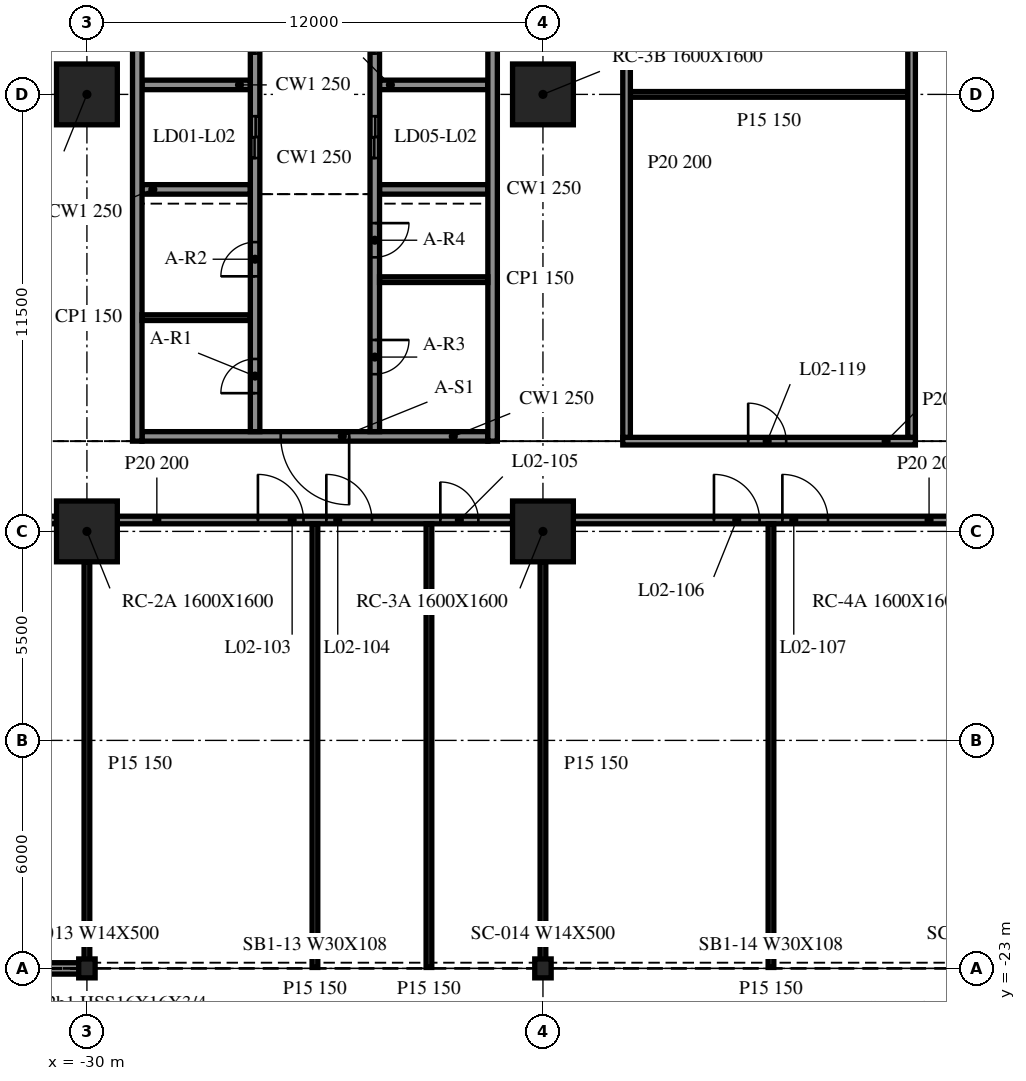
"""IFC4 building model, lengths in metres.
Left out: names, types, materials, properties, quantities, classifications, styles, units other than length and angle.
Written with IfcOpenShell. Run it as: python <this file> out.ifc"""

import sys

from ifc_helpers import new_model, si_unit, direction, frame, frame_2d, origin, origin_2d, place, context, subcontext, project, spatial, rectangle, i_section, extrude, element, fill, save


model = new_model("IFC4")
c1 = context("Model", 3, precision=1e-05, world=origin(), true_north=direction((0.0, 1.0)))
c2 = subcontext(c1, "Body", "Model", "MODEL_VIEW")
j1 = project(units=[si_unit("LENGTHUNIT", "METRE"), si_unit("PLANEANGLEUNIT", "RADIAN")], contexts=[c1])
p1 = place(None, origin())
s1 = spatial("IfcSite", under=j1, at=p1, CompositionType="ELEMENT")
p2 = place(p1, origin())
s2 = spatial("IfcBuilding", under=s1, at=p2, CompositionType="ELEMENT")
p3 = place(p2, frame((0.0, 0.0, 11.5)))
s3 = spatial("IfcBuildingStorey", under=s2, at=p3, CompositionType="ELEMENT", Elevation=11.5)
for number, where, z_axis, x_axis in (
    (1, (-30.0, -11.5, -0.34), (0.0, 0.0, 1.0), (1.0, 0.0, 0.0)),
    (2, (-30.0, 0.0, -0.34), (0.0, 0.0, 1.0), (1.0, 0.0, 0.0)),
    (3, (-18.0, -11.5, -0.34), (0.0, 0.0, 1.0), (1.0, 0.0, 0.0)),
    (4, (-18.0, 0.0, -0.34), (0.0, 0.0, 1.0), (1.0, 0.0, 0.0)),
):
    element("IfcColumn", number, at=place(p3, frame(where, z_axis=z_axis, x_axis=x_axis)), inside=s3, PredefinedType="COLUMN", context=c2, shape_type="SweptSolid", body=[
        extrude(rectangle(XDim=1.6, YDim=1.6, at=origin_2d()), origin(), (0.0, 0.0, 1.0), 4.3),
    ])
for number, where, z_axis, x_axis in (
    (5, (-30.0, -23.0, -0.34), (0.0, 0.0, 1.0), (1.0, 0.0, 0.0)),
    (6, (-18.0, -23.0, -0.34), (0.0, 0.0, 1.0), (1.0, 0.0, 0.0)),
):
    element("IfcColumn", number, at=place(p3, frame(where, z_axis=z_axis, x_axis=x_axis)), inside=s3, PredefinedType="COLUMN", context=c2, shape_type="SweptSolid", body=[
        extrude(i_section(OverallWidth=0.432, OverallDepth=0.498, WebThickness=0.056, FlangeThickness=0.089, at=origin_2d()), origin(), (0.0, 0.0, 1.0), 4.3),
    ])
p4 = place(p3, frame((-41.972, -23.0, 0.0), z_axis=(0.0, 0.0, 1.0), x_axis=(1.0, 0.0, 0.0)))
e7 = element("IfcWall", 7, at=p4, inside=s3, PredefinedType="NOTDEFINED", context=c2, shape_type="SweptSolid", body=[
    extrude(rectangle(XDim=11.944, YDim=0.3, at=frame_2d((5.972, 0.0))), origin(), (0.0, 0.0, 1.0), 3.203),
])
for number, where, z_axis, x_axis in (
    (8, (-28.675, 15.125, 0.0), (0.0, 0.0, 1.0), (0.0, -1.0, 0.0)),
    (9, (-19.325, -9.125, 0.0), (0.0, 0.0, 1.0), (0.0, 1.0, 0.0)),
):
    element("IfcWall", number, at=place(p3, frame(where, z_axis=z_axis, x_axis=x_axis)), inside=s3, PredefinedType="SOLIDWALL", context=c2, shape_type="SweptSolid", body=[
        extrude(rectangle(XDim=24.25, YDim=0.25, at=frame_2d((12.125, 0.0))), origin(), (0.0, 0.0, 1.0), 3.96),
    ])
p5 = place(p3, frame((-19.45, -9.0, 0.0), z_axis=(0.0, 0.0, 1.0), x_axis=(-1.0, 0.0, 0.0)))
e10 = element("IfcWall", 10, at=p5, inside=s3, PredefinedType="SOLIDWALL", context=c2, shape_type="SweptSolid", body=[
    extrude(rectangle(XDim=9.1, YDim=0.25, at=frame_2d((4.55, 0.0))), origin(), (0.0, 0.0, 1.0), 3.96),
])
p6 = place(p5, frame((3.65, 0.0, 0.0)))
e11 = element("IfcOpeningElement", 11, at=p6, cuts=e10, PredefinedType="OPENING", context=c2, shape_type="SweptSolid", body=[
    extrude(rectangle(XDim=1.8, YDim=2.1, at=frame_2d((0.9, 1.05))), frame((0.0, 0.135, 0.0), z_axis=(0.0, -1.0, 0.0), x_axis=(1.0, 0.0, 0.0)), (0.0, 0.0, 1.0), 0.27),
])
p7 = place(p3, frame((-25.575, -8.875, 0.0), z_axis=(0.0, 0.0, 1.0), x_axis=(0.0, 1.0, 0.0)))
e12 = element("IfcWall", 12, at=p7, inside=s3, PredefinedType="SOLIDWALL", context=c2, shape_type="SweptSolid", body=[
    extrude(rectangle(XDim=17.5, YDim=0.25, at=frame_2d((8.75, 0.0))), origin(), (0.0, 0.0, 1.0), 3.96),
])
p8 = place(p7, frame((7.2, 0.0, 0.0)))
e13 = element("IfcOpeningElement", 13, at=p8, cuts=e12, PredefinedType="OPENING", context=c2, shape_type="SweptSolid", body=[
    extrude(rectangle(XDim=1.1, YDim=2.1, at=frame_2d((0.55, 1.05))), frame((0.0, 0.135, 0.0), z_axis=(0.0, -1.0, 0.0), x_axis=(1.0, 0.0, 0.0)), (0.0, 0.0, 1.0), 0.27),
])
p9 = place(p7, frame((9.95, 0.0, 0.0)))
e14 = element("IfcOpeningElement", 14, at=p9, cuts=e12, PredefinedType="OPENING", context=c2, shape_type="SweptSolid", body=[
    extrude(rectangle(XDim=1.1, YDim=2.1, at=frame_2d((0.55, 1.05))), frame((0.0, 0.135, 0.0), z_axis=(0.0, -1.0, 0.0), x_axis=(1.0, 0.0, 0.0)), (0.0, 0.0, 1.0), 0.27),
])
p10 = place(p7, frame((12.7, 0.0, 0.0)))
e15 = element("IfcOpeningElement", 15, at=p10, cuts=e12, PredefinedType="OPENING", context=c2, shape_type="SweptSolid", body=[
    extrude(rectangle(XDim=1.1, YDim=2.1, at=frame_2d((0.55, 1.05))), frame((0.0, 0.135, 0.0), z_axis=(0.0, -1.0, 0.0), x_axis=(1.0, 0.0, 0.0)), (0.0, 0.0, 1.0), 0.27),
])
p11 = place(p7, frame((15.45, 0.0, 0.0)))
e16 = element("IfcOpeningElement", 16, at=p11, cuts=e12, PredefinedType="OPENING", context=c2, shape_type="SweptSolid", body=[
    extrude(rectangle(XDim=1.1, YDim=2.1, at=frame_2d((0.55, 1.05))), frame((0.0, 0.135, 0.0), z_axis=(0.0, -1.0, 0.0), x_axis=(1.0, 0.0, 0.0)), (0.0, 0.0, 1.0), 0.27),
])
p12 = place(p7, frame((1.012, 0.0, 0.0)))
e17 = element("IfcOpeningElement", 17, at=p12, cuts=e12, PredefinedType="OPENING", context=c2, shape_type="SweptSolid", body=[
    extrude(rectangle(XDim=0.9, YDim=2.1, at=frame_2d((0.45, 1.05))), frame((0.0, 0.135, 0.0), z_axis=(0.0, -1.0, 0.0), x_axis=(1.0, 0.0, 0.0)), (0.0, 0.0, 1.0), 0.27),
])
p13 = place(p7, frame((4.087, 0.0, 0.0)))
e18 = element("IfcOpeningElement", 18, at=p13, cuts=e12, PredefinedType="OPENING", context=c2, shape_type="SweptSolid", body=[
    extrude(rectangle(XDim=0.9, YDim=2.1, at=frame_2d((0.45, 1.05))), frame((0.0, 0.135, 0.0), z_axis=(0.0, -1.0, 0.0), x_axis=(1.0, 0.0, 0.0)), (0.0, 0.0, 1.0), 0.27),
])
p14 = place(p3, frame((-22.425, 14.875, 0.0), z_axis=(0.0, 0.0, 1.0), x_axis=(0.0, -1.0, 0.0)))
e19 = element("IfcWall", 19, at=p14, inside=s3, PredefinedType="SOLIDWALL", context=c2, shape_type="SweptSolid", body=[
    extrude(rectangle(XDim=23.75, YDim=0.25, at=frame_2d((11.875, 0.0))), origin(), (0.0, 0.0, 1.0), 3.96),
])
p15 = place(p14, frame((15.45, 0.0, 0.0)))
e20 = element("IfcOpeningElement", 20, at=p15, cuts=e19, PredefinedType="OPENING", context=c2, shape_type="SweptSolid", body=[
    extrude(rectangle(XDim=1.1, YDim=2.1, at=frame_2d((0.55, 1.05))), frame((0.0, 0.135, 0.0), z_axis=(0.0, -1.0, 0.0), x_axis=(1.0, 0.0, 0.0)), (0.0, 0.0, 1.0), 0.27),
])
p16 = place(p14, frame((12.7, 0.0, 0.0)))
e21 = element("IfcOpeningElement", 21, at=p16, cuts=e19, PredefinedType="OPENING", context=c2, shape_type="SweptSolid", body=[
    extrude(rectangle(XDim=1.1, YDim=2.1, at=frame_2d((0.55, 1.05))), frame((0.0, 0.135, 0.0), z_axis=(0.0, -1.0, 0.0), x_axis=(1.0, 0.0, 0.0)), (0.0, 0.0, 1.0), 0.27),
])
p17 = place(p14, frame((21.337, 0.0, 0.0)))
e22 = element("IfcOpeningElement", 22, at=p17, cuts=e19, PredefinedType="OPENING", context=c2, shape_type="SweptSolid", body=[
    extrude(rectangle(XDim=0.9, YDim=2.1, at=frame_2d((0.45, 1.05))), frame((0.0, 0.135, 0.0), z_axis=(0.0, -1.0, 0.0), x_axis=(1.0, 0.0, 0.0)), (0.0, 0.0, 1.0), 0.27),
])
p18 = place(p14, frame((18.262, 0.0, 0.0)))
e23 = element("IfcOpeningElement", 23, at=p18, cuts=e19, PredefinedType="OPENING", context=c2, shape_type="SweptSolid", body=[
    extrude(rectangle(XDim=0.9, YDim=2.1, at=frame_2d((0.45, 1.05))), frame((0.0, 0.135, 0.0), z_axis=(0.0, -1.0, 0.0), x_axis=(1.0, 0.0, 0.0)), (0.0, 0.0, 1.0), 0.27),
])
p19 = place(p14, frame((4.387, 0.0, 0.0)))
e24 = element("IfcOpeningElement", 24, at=p19, cuts=e19, PredefinedType="OPENING", context=c2, shape_type="SweptSolid", body=[
    extrude(rectangle(XDim=0.9, YDim=2.1, at=frame_2d((0.45, 1.05))), frame((0.0, 0.135, 0.0), z_axis=(0.0, -1.0, 0.0), x_axis=(1.0, 0.0, 0.0)), (0.0, 0.0, 1.0), 0.27),
])
p20 = place(p14, frame((1.312, 0.0, 0.0)))
e25 = element("IfcOpeningElement", 25, at=p20, cuts=e19, PredefinedType="OPENING", context=c2, shape_type="SweptSolid", body=[
    extrude(rectangle(XDim=0.9, YDim=2.1, at=frame_2d((0.45, 1.05))), frame((0.0, 0.135, 0.0), z_axis=(0.0, -1.0, 0.0), x_axis=(1.0, 0.0, 0.0)), (0.0, 0.0, 1.0), 0.27),
])
for number, where, z_axis, x_axis in (
    (26, (-28.55, -2.5, 0.0), (0.0, 0.0, 1.0), (1.0, 0.0, 0.0)),
    (27, (-28.55, 0.25, 0.0), (0.0, 0.0, 1.0), (1.0, 0.0, 0.0)),
    (28, (-22.3, -2.5, 0.0), (0.0, 0.0, 1.0), (1.0, 0.0, 0.0)),
    (29, (-22.3, 0.25, 0.0), (0.0, 0.0, 1.0), (1.0, 0.0, 0.0)),
):
    element("IfcWall", number, at=place(p3, frame(where, z_axis=z_axis, x_axis=x_axis)), inside=s3, PredefinedType="SOLIDWALL", context=c2, shape_type="SweptSolid", body=[
        extrude(rectangle(XDim=2.85, YDim=0.25, at=frame_2d((1.425, 0.0))), origin(), (0.0, 0.0, 1.0), 3.96),
    ])
for number, where, z_axis, x_axis in (
    (30, (-28.55, -5.875, 0.0), (0.0, 0.0, 1.0), (1.0, 0.0, 0.0)),
    (31, (-22.3, -4.875, 0.0), (0.0, 0.0, 1.0), (1.0, 0.0, 0.0)),
):
    element("IfcWall", number, at=place(p3, frame(where, z_axis=z_axis, x_axis=x_axis)), inside=s3, PredefinedType="PARTITIONING", context=c2, shape_type="SweptSolid", body=[
        extrude(rectangle(XDim=2.85, YDim=0.15, at=frame_2d((1.425, 0.0))), origin(), (0.0, 0.0, 1.0), 3.96),
    ])
p21 = place(p3, frame((-41.2, -11.2, 0.0), z_axis=(0.0, 0.0, 1.0), x_axis=(1.0, 0.0, 0.0)))
e32 = element("IfcWall", 32, at=p21, inside=s3, PredefinedType="PARTITIONING", context=c2, shape_type="SweptSolid", body=[
    extrude(rectangle(XDim=10.4, YDim=0.2, at=frame_2d((5.2, 0.0))), origin(), (0.0, 0.0, 1.0), 3.96),
])
p22 = place(p21, frame((5.5, 0.0, 0.0)))
e33 = element("IfcOpeningElement", 33, at=p22, cuts=e32, PredefinedType="OPENING", context=c2, shape_type="SweptSolid", body=[
    extrude(rectangle(XDim=1.2, YDim=2.1, at=frame_2d((0.6, 1.05))), frame((0.0, 0.11, 0.0), z_axis=(0.0, -1.0, 0.0), x_axis=(1.0, 0.0, 0.0)), (0.0, 0.0, 1.0), 0.22),
])
p23 = place(p3, frame((-29.2, -11.2, 0.0), z_axis=(0.0, 0.0, 1.0), x_axis=(1.0, 0.0, 0.0)))
e34 = element("IfcWall", 34, at=p23, inside=s3, PredefinedType="PARTITIONING", context=c2, shape_type="SweptSolid", body=[
    extrude(rectangle(XDim=10.4, YDim=0.2, at=frame_2d((5.2, 0.0))), origin(), (0.0, 0.0, 1.0), 3.96),
])
p24 = place(p23, frame((3.7, 0.0, 0.0)))
e35 = element("IfcOpeningElement", 35, at=p24, cuts=e34, PredefinedType="OPENING", context=c2, shape_type="SweptSolid", body=[
    extrude(rectangle(XDim=1.2, YDim=2.1, at=frame_2d((0.6, 1.05))), frame((0.0, 0.11, 0.0), z_axis=(0.0, -1.0, 0.0), x_axis=(1.0, 0.0, 0.0)), (0.0, 0.0, 1.0), 0.22),
])
p25 = place(p23, frame((5.5, 0.0, 0.0)))
e36 = element("IfcOpeningElement", 36, at=p25, cuts=e34, PredefinedType="OPENING", context=c2, shape_type="SweptSolid", body=[
    extrude(rectangle(XDim=1.2, YDim=2.1, at=frame_2d((0.6, 1.05))), frame((0.0, 0.11, 0.0), z_axis=(0.0, -1.0, 0.0), x_axis=(1.0, 0.0, 0.0)), (0.0, 0.0, 1.0), 0.22),
])
p26 = place(p23, frame((8.5, 0.0, 0.0)))
e37 = element("IfcOpeningElement", 37, at=p26, cuts=e34, PredefinedType="OPENING", context=c2, shape_type="SweptSolid", body=[
    extrude(rectangle(XDim=1.0, YDim=2.1, at=frame_2d((0.5, 1.05))), frame((0.0, 0.11, 0.0), z_axis=(0.0, -1.0, 0.0), x_axis=(1.0, 0.0, 0.0)), (0.0, 0.0, 1.0), 0.22),
])
p27 = place(p3, frame((-17.2, -11.2, 0.0), z_axis=(0.0, 0.0, 1.0), x_axis=(1.0, 0.0, 0.0)))
e38 = element("IfcWall", 38, at=p27, inside=s3, PredefinedType="PARTITIONING", context=c2, shape_type="SweptSolid", body=[
    extrude(rectangle(XDim=10.4, YDim=0.2, at=frame_2d((5.2, 0.0))), origin(), (0.0, 0.0, 1.0), 3.96),
])
p28 = place(p27, frame((3.7, 0.0, 0.0)))
e39 = element("IfcOpeningElement", 39, at=p28, cuts=e38, PredefinedType="OPENING", context=c2, shape_type="SweptSolid", body=[
    extrude(rectangle(XDim=1.2, YDim=2.1, at=frame_2d((0.6, 1.05))), frame((0.0, 0.11, 0.0), z_axis=(0.0, -1.0, 0.0), x_axis=(1.0, 0.0, 0.0)), (0.0, 0.0, 1.0), 0.22),
])
p29 = place(p27, frame((5.5, 0.0, 0.0)))
e40 = element("IfcOpeningElement", 40, at=p29, cuts=e38, PredefinedType="OPENING", context=c2, shape_type="SweptSolid", body=[
    extrude(rectangle(XDim=1.2, YDim=2.1, at=frame_2d((0.6, 1.05))), frame((0.0, 0.11, 0.0), z_axis=(0.0, -1.0, 0.0), x_axis=(1.0, 0.0, 0.0)), (0.0, 0.0, 1.0), 0.22),
])
p30 = place(p3, frame((-15.9, -9.125, 0.0), z_axis=(0.0, 0.0, 1.0), x_axis=(1.0, 0.0, 0.0)))
e41 = element("IfcWall", 41, at=p30, inside=s3, PredefinedType="PARTITIONING", context=c2, shape_type="SweptSolid", body=[
    extrude(rectangle(XDim=7.7, YDim=0.2, at=frame_2d((3.85, 0.0))), origin(), (0.0, 0.0, 1.0), 3.96),
])
p31 = place(p30, frame((3.3, 0.0, 0.0)))
e42 = element("IfcOpeningElement", 42, at=p31, cuts=e41, PredefinedType="OPENING", context=c2, shape_type="SweptSolid", body=[
    extrude(rectangle(XDim=1.0, YDim=2.1, at=frame_2d((0.5, 1.05))), frame((0.0, 0.11, 0.0), z_axis=(0.0, -1.0, 0.0), x_axis=(1.0, 0.0, 0.0)), (0.0, 0.0, 1.0), 0.22),
])
p32 = place(p3, frame((-15.7, 0.0, 0.0), z_axis=(0.0, 0.0, 1.0), x_axis=(1.0, 0.0, 0.0)))
e43 = element("IfcWall", 43, at=p32, inside=s3, PredefinedType="PARTITIONING", context=c2, shape_type="SweptSolid", body=[
    extrude(rectangle(XDim=7.3, YDim=0.15, at=frame_2d((3.65, 0.0))), origin(), (0.0, 0.0, 1.0), 3.96),
])
p33 = place(p3, frame((-30.0, -22.975, 0.0), z_axis=(0.0, 0.0, 1.0), x_axis=(0.0, 1.0, 0.0)))
e44 = element("IfcWall", 44, at=p33, inside=s3, PredefinedType="PARTITIONING", context=c2, shape_type="SweptSolid", body=[
    extrude(rectangle(XDim=10.675, YDim=0.15, at=frame_2d((5.337, 0.0))), origin(), (0.0, 0.0, 1.0), 3.96),
])
for number, where, z_axis, x_axis in (
    (45, (-24.0, -22.975, 0.0), (0.0, 0.0, 1.0), (0.0, 1.0, 0.0)),
    (46, (-21.0, -22.975, 0.0), (0.0, 0.0, 1.0), (0.0, 1.0, 0.0)),
):
    element("IfcWall", number, at=place(p3, frame(where, z_axis=z_axis, x_axis=x_axis)), inside=s3, PredefinedType="PARTITIONING", context=c2, shape_type="SweptSolid", body=[
        extrude(rectangle(XDim=11.675, YDim=0.15, at=frame_2d((5.837, 0.0))), origin(), (0.0, 0.0, 1.0), 3.96),
    ])
p34 = place(p3, frame((-18.0, -22.975, 0.0), z_axis=(0.0, 0.0, 1.0), x_axis=(0.0, 1.0, 0.0)))
e47 = element("IfcWall", 47, at=p34, inside=s3, PredefinedType="PARTITIONING", context=c2, shape_type="SweptSolid", body=[
    extrude(rectangle(XDim=10.675, YDim=0.15, at=frame_2d((5.337, 0.0))), origin(), (0.0, 0.0, 1.0), 3.96),
])
p35 = place(p3, frame((-15.8, -9.025, 0.0), z_axis=(0.0, 0.0, 1.0), x_axis=(0.0, 1.0, 0.0)))
e48 = element("IfcWall", 48, at=p35, inside=s3, PredefinedType="PARTITIONING", context=c2, shape_type="SweptSolid", body=[
    extrude(rectangle(XDim=24.05, YDim=0.2, at=frame_2d((12.025, 0.0))), origin(), (0.0, 0.0, 1.0), 3.96),
])
p36 = place(p35, frame((11.5, 0.0, 0.0)))
e49 = element("IfcOpeningElement", 49, at=p36, cuts=e48, PredefinedType="OPENING", context=c2, shape_type="SweptSolid", body=[
    extrude(rectangle(XDim=1.0, YDim=2.1, at=frame_2d((0.5, 1.05))), frame((0.0, 0.11, 0.0), z_axis=(0.0, -1.0, 0.0), x_axis=(1.0, 0.0, 0.0)), (0.0, 0.0, 1.0), 0.22),
])
p37 = place(p3, frame((-12.0, -22.975, 0.0), z_axis=(0.0, 0.0, 1.0), x_axis=(0.0, 1.0, 0.0)))
e50 = element("IfcWall", 50, at=p37, inside=s3, PredefinedType="PARTITIONING", context=c2, shape_type="SweptSolid", body=[
    extrude(rectangle(XDim=11.675, YDim=0.15, at=frame_2d((5.837, 0.0))), origin(), (0.0, 0.0, 1.0), 3.96),
])
p38 = place(p3, frame((-8.3, -9.025, 0.0), z_axis=(0.0, 0.0, 1.0), x_axis=(0.0, 1.0, 0.0)))
e51 = element("IfcWall", 51, at=p38, inside=s3, PredefinedType="PARTITIONING", context=c2, shape_type="SweptSolid", body=[
    extrude(rectangle(XDim=24.05, YDim=0.2, at=frame_2d((12.025, 0.0))), origin(), (0.0, 0.0, 1.0), 3.96),
])
p39 = place(p6, origin())
e52 = element("IfcDoor", 52, at=p39, inside=s3, OperationType="DOUBLE_DOOR_SINGLE_SWING", PredefinedType="DOOR", context=c2, shape_type="SweptSolid", body=[
    extrude(rectangle(XDim=1.8, YDim=2.1, at=frame_2d((0.9, 1.05))), frame((0.0, 0.025, 0.0), z_axis=(0.0, -1.0, 0.0), x_axis=(1.0, 0.0, 0.0)), (0.0, 0.0, 1.0), 0.05),
])
fill(e11, e52)
p40 = place(p15, origin())
e53 = element("IfcDoor", 53, at=p40, inside=s3, OperationType="DOUBLE_DOOR_SLIDING", PredefinedType="DOOR", context=c2, shape_type="SweptSolid", body=[
    extrude(rectangle(XDim=1.1, YDim=2.1, at=frame_2d((0.55, 1.05))), frame((0.0, 0.025, 0.0), z_axis=(0.0, -1.0, 0.0), x_axis=(1.0, 0.0, 0.0)), (0.0, 0.0, 1.0), 0.05),
])
fill(e20, e53)
p41 = place(p16, origin())
e54 = element("IfcDoor", 54, at=p41, inside=s3, OperationType="DOUBLE_DOOR_SLIDING", PredefinedType="DOOR", context=c2, shape_type="SweptSolid", body=[
    extrude(rectangle(XDim=1.1, YDim=2.1, at=frame_2d((0.55, 1.05))), frame((0.0, 0.025, 0.0), z_axis=(0.0, -1.0, 0.0), x_axis=(1.0, 0.0, 0.0)), (0.0, 0.0, 1.0), 0.05),
])
fill(e21, e54)
p42 = place(p8, origin())
e55 = element("IfcDoor", 55, at=p42, inside=s3, OperationType="DOUBLE_DOOR_SLIDING", PredefinedType="DOOR", context=c2, shape_type="SweptSolid", body=[
    extrude(rectangle(XDim=1.1, YDim=2.1, at=frame_2d((0.55, 1.05))), frame((0.0, 0.025, 0.0), z_axis=(0.0, -1.0, 0.0), x_axis=(1.0, 0.0, 0.0)), (0.0, 0.0, 1.0), 0.05),
])
fill(e13, e55)
p43 = place(p9, origin())
e56 = element("IfcDoor", 56, at=p43, inside=s3, OperationType="DOUBLE_DOOR_SLIDING", PredefinedType="DOOR", context=c2, shape_type="SweptSolid", body=[
    extrude(rectangle(XDim=1.1, YDim=2.1, at=frame_2d((0.55, 1.05))), frame((0.0, 0.025, 0.0), z_axis=(0.0, -1.0, 0.0), x_axis=(1.0, 0.0, 0.0)), (0.0, 0.0, 1.0), 0.05),
])
fill(e14, e56)
p44 = place(p12, origin())
e57 = element("IfcDoor", 57, at=p44, inside=s3, OperationType="SINGLE_SWING_LEFT", PredefinedType="DOOR", context=c2, shape_type="SweptSolid", body=[
    extrude(rectangle(XDim=0.9, YDim=2.1, at=frame_2d((0.45, 1.05))), frame((0.0, 0.025, 0.0), z_axis=(0.0, -1.0, 0.0), x_axis=(1.0, 0.0, 0.0)), (0.0, 0.0, 1.0), 0.05),
])
fill(e17, e57)
p45 = place(p13, origin())
e58 = element("IfcDoor", 58, at=p45, inside=s3, OperationType="SINGLE_SWING_RIGHT", PredefinedType="DOOR", context=c2, shape_type="SweptSolid", body=[
    extrude(rectangle(XDim=0.9, YDim=2.1, at=frame_2d((0.45, 1.05))), frame((0.0, 0.025, 0.0), z_axis=(0.0, -1.0, 0.0), x_axis=(1.0, 0.0, 0.0)), (0.0, 0.0, 1.0), 0.05),
])
fill(e18, e58)
p46 = place(p17, origin())
e59 = element("IfcDoor", 59, at=p46, inside=s3, OperationType="SINGLE_SWING_LEFT", PredefinedType="DOOR", context=c2, shape_type="SweptSolid", body=[
    extrude(rectangle(XDim=0.9, YDim=2.1, at=frame_2d((0.45, 1.05))), frame((0.0, 0.025, 0.0), z_axis=(0.0, -1.0, 0.0), x_axis=(1.0, 0.0, 0.0)), (0.0, 0.0, 1.0), 0.05),
])
fill(e22, e59)
p47 = place(p18, origin())
e60 = element("IfcDoor", 60, at=p47, inside=s3, OperationType="SINGLE_SWING_RIGHT", PredefinedType="DOOR", context=c2, shape_type="SweptSolid", body=[
    extrude(rectangle(XDim=0.9, YDim=2.1, at=frame_2d((0.45, 1.05))), frame((0.0, 0.025, 0.0), z_axis=(0.0, -1.0, 0.0), x_axis=(1.0, 0.0, 0.0)), (0.0, 0.0, 1.0), 0.05),
])
fill(e23, e60)
p48 = place(p24, origin())
e61 = element("IfcDoor", 61, at=p48, inside=s3, OperationType="SINGLE_SWING_RIGHT", PredefinedType="DOOR", context=c2, shape_type="SweptSolid", body=[
    extrude(rectangle(XDim=1.2, YDim=2.1, at=frame_2d((0.6, 1.05))), frame((0.0, 0.025, 0.0), z_axis=(0.0, -1.0, 0.0), x_axis=(1.0, 0.0, 0.0)), (0.0, 0.0, 1.0), 0.05),
])
fill(e35, e61)
p49 = place(p25, origin())
e62 = element("IfcDoor", 62, at=p49, inside=s3, OperationType="SINGLE_SWING_LEFT", PredefinedType="DOOR", context=c2, shape_type="SweptSolid", body=[
    extrude(rectangle(XDim=1.2, YDim=2.1, at=frame_2d((0.6, 1.05))), frame((0.0, 0.025, 0.0), z_axis=(0.0, -1.0, 0.0), x_axis=(1.0, 0.0, 0.0)), (0.0, 0.0, 1.0), 0.05),
])
fill(e36, e62)
p50 = place(p26, origin())
e63 = element("IfcDoor", 63, at=p50, inside=s3, OperationType="SINGLE_SWING_LEFT", PredefinedType="DOOR", context=c2, shape_type="SweptSolid", body=[
    extrude(rectangle(XDim=1.0, YDim=2.1, at=frame_2d((0.5, 1.05))), frame((0.0, 0.025, 0.0), z_axis=(0.0, -1.0, 0.0), x_axis=(1.0, 0.0, 0.0)), (0.0, 0.0, 1.0), 0.05),
])
fill(e37, e63)
p51 = place(p28, origin())
e64 = element("IfcDoor", 64, at=p51, inside=s3, OperationType="SINGLE_SWING_RIGHT", PredefinedType="DOOR", context=c2, shape_type="SweptSolid", body=[
    extrude(rectangle(XDim=1.2, YDim=2.1, at=frame_2d((0.6, 1.05))), frame((0.0, 0.025, 0.0), z_axis=(0.0, -1.0, 0.0), x_axis=(1.0, 0.0, 0.0)), (0.0, 0.0, 1.0), 0.05),
])
fill(e39, e64)
p52 = place(p29, origin())
e65 = element("IfcDoor", 65, at=p52, inside=s3, OperationType="SINGLE_SWING_LEFT", PredefinedType="DOOR", context=c2, shape_type="SweptSolid", body=[
    extrude(rectangle(XDim=1.2, YDim=2.1, at=frame_2d((0.6, 1.05))), frame((0.0, 0.025, 0.0), z_axis=(0.0, -1.0, 0.0), x_axis=(1.0, 0.0, 0.0)), (0.0, 0.0, 1.0), 0.05),
])
fill(e40, e65)
p53 = place(p31, origin())
e66 = element("IfcDoor", 66, at=p53, inside=s3, OperationType="SINGLE_SWING_LEFT", PredefinedType="DOOR", context=c2, shape_type="SweptSolid", body=[
    extrude(rectangle(XDim=1.0, YDim=2.1, at=frame_2d((0.5, 1.05))), frame((0.0, 0.025, 0.0), z_axis=(0.0, -1.0, 0.0), x_axis=(1.0, 0.0, 0.0)), (0.0, 0.0, 1.0), 0.05),
])
fill(e42, e66)
save(model, sys.argv[1])
